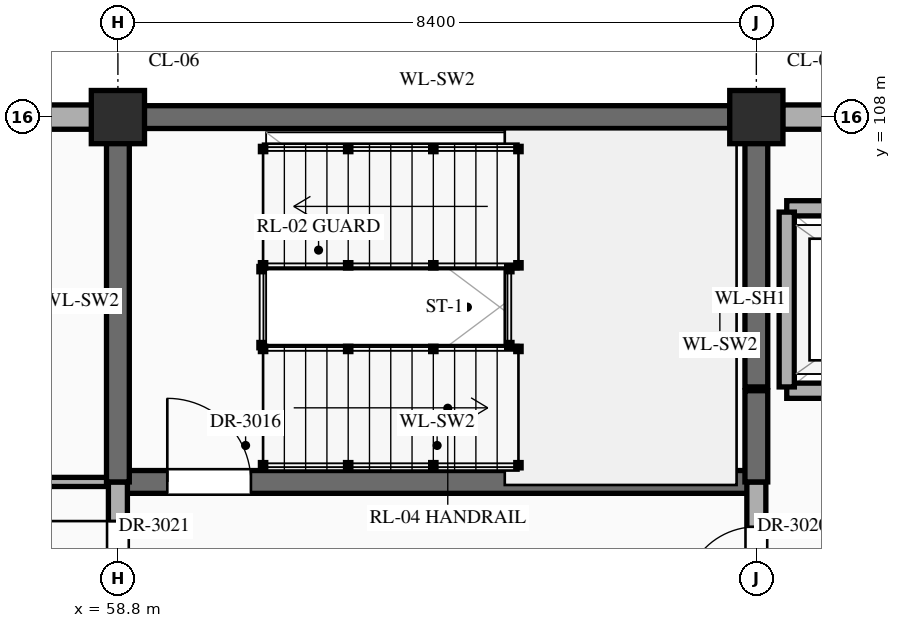
"""IFC4 building model, lengths in metres.
Left out: names, types, materials, properties, quantities, classifications, styles, units other than length and angle.
Written with IfcOpenShell. Run it as: python <this file> out.ifc"""

import sys

from ifc_helpers import new_model, si_unit, direction, frame, frame_2d, origin, origin_2d, place, context, subcontext, project, spatial, rectangle, extrude, element, fill, save


model = new_model("IFC4")
c1 = context("Model", 3, precision=1e-05, world=origin(), true_north=direction((0.0, 1.0)))
c2 = subcontext(c1, "Body", "Model", "MODEL_VIEW")
j1 = project(units=[si_unit("LENGTHUNIT", "METRE"), si_unit("PLANEANGLEUNIT", "RADIAN")], contexts=[c1])
p1 = place(None, origin())
s1 = spatial("IfcSite", under=j1, at=p1, CompositionType="ELEMENT")
p2 = place(p1, origin())
s2 = spatial("IfcBuilding", under=s1, at=p2, CompositionType="ELEMENT")
p3 = place(p2, frame((0.0, 0.0, 51.9)))
s3 = spatial("IfcBuildingStorey", under=s2, at=p3, CompositionType="ELEMENT", Elevation=51.9)
for number, where, z_axis, x_axis in (
    (1, (58.8, 108.0, 0.0), (0.0, 0.0, 1.0), (1.0, 0.0, 0.0)),
    (2, (67.2, 108.0, 0.0), (0.0, 0.0, 1.0), (1.0, 0.0, 0.0)),
):
    element("IfcColumn", number, at=place(p3, frame(where, z_axis=z_axis, x_axis=x_axis)), inside=s3, PredefinedType="COLUMN", context=c2, shape_type="SweptSolid", body=[
        extrude(rectangle(XDim=0.7, YDim=0.7, at=origin_2d()), origin(), (0.0, 0.0, 1.0), 4.2),
    ])
p4 = place(p3, frame((50.745, 108.0, 0.0), z_axis=(0.0, 0.0, 1.0), x_axis=(1.0, 0.0, 0.0)))
e3 = element("IfcWall", 3, at=p4, inside=s3, PredefinedType="STANDARD", context=c2, shape_type="SweptSolid", body=[
    extrude(rectangle(XDim=7.71, YDim=0.32, at=frame_2d((3.855, 0.0))), origin(), (0.0, 0.0, 1.0), 3.31),
])
p5 = place(p4, frame((5.33, 0.0, 0.55)))
e4 = element("IfcOpeningElement", 4, at=p5, cuts=e3, PredefinedType="OPENING", context=c2, shape_type="SweptSolid", body=[
    extrude(rectangle(XDim=1.05, YDim=1.2, at=frame_2d((0.525, 0.6))), frame((0.0, 0.172, 0.0), z_axis=(0.0, -1.0, 0.0), x_axis=(1.0, 0.0, 0.0)), (0.0, 0.0, 1.0), 0.344),
])
p6 = place(p3, frame((59.145, 108.0, 0.0), z_axis=(0.0, 0.0, 1.0), x_axis=(1.0, 0.0, 0.0)))
e5 = element("IfcWall", 5, at=p6, inside=s3, PredefinedType="SHEAR", context=c2, shape_type="SweptSolid", body=[
    extrude(rectangle(XDim=7.71, YDim=0.3, at=frame_2d((3.855, 0.0))), origin(), (0.0, 0.0, 1.0), 3.96),
])
p7 = place(p3, frame((67.545, 108.0, 0.0), z_axis=(0.0, 0.0, 1.0), x_axis=(1.0, 0.0, 0.0)))
e6 = element("IfcWall", 6, at=p7, inside=s3, PredefinedType="STANDARD", context=c2, shape_type="SweptSolid", body=[
    extrude(rectangle(XDim=7.71, YDim=0.32, at=frame_2d((3.855, 0.0))), origin(), (0.0, 0.0, 1.0), 3.31),
])
p8 = place(p3, frame((50.44, 103.2, 0.0), z_axis=(0.0, 0.0, 1.0), x_axis=(1.0, 0.0, 0.0)))
e7 = element("IfcWall", 7, at=p8, inside=s3, PredefinedType="STANDARD", context=c2, shape_type="SweptSolid", body=[
    extrude(rectangle(XDim=8.36, YDim=0.12, at=frame_2d((4.18, 0.0))), origin(), (0.0, 0.0, 1.0), 3.96),
])
p9 = place(p8, frame((3.67, 0.0, 0.0)))
e8 = element("IfcOpeningElement", 8, at=p9, cuts=e7, PredefinedType="OPENING", context=c2, shape_type="SweptSolid", body=[
    extrude(rectangle(XDim=1.02, YDim=2.4, at=frame_2d((0.51, 1.2))), frame((0.0, 0.072, 0.0), z_axis=(0.0, -1.0, 0.0), x_axis=(1.0, 0.0, 0.0)), (0.0, 0.0, 1.0), 0.144),
])
p10 = place(p3, frame((58.8, 103.2, 0.0), z_axis=(0.0, 0.0, 1.0), x_axis=(1.0, 0.0, 0.0)))
e9 = element("IfcWall", 9, at=p10, inside=s3, PredefinedType="SHEAR", context=c2, shape_type="SweptSolid", body=[
    extrude(rectangle(XDim=8.4, YDim=0.3, at=frame_2d((4.2, 0.0))), origin(), (0.0, 0.0, 1.0), 3.96),
])
p11 = place(p10, frame((0.65, 0.0, 0.0)))
e10 = element("IfcOpeningElement", 10, at=p11, cuts=e9, PredefinedType="OPENING", context=c2, shape_type="SweptSolid", body=[
    extrude(rectangle(XDim=1.1, YDim=2.2, at=frame_2d((0.55, 1.1))), frame((0.0, 0.162, 0.0), z_axis=(0.0, -1.0, 0.0), x_axis=(1.0, 0.0, 0.0)), (0.0, 0.0, 1.0), 0.324),
])
p12 = place(p3, frame((67.6, 104.4, 0.0), z_axis=(0.0, 0.0, 1.0), x_axis=(1.0, 0.0, 0.0)))
e11 = element("IfcWall", 11, at=p12, inside=s3, PredefinedType="STANDARD", context=c2, shape_type="SweptSolid", body=[
    extrude(rectangle(XDim=3.0, YDim=0.2, at=frame_2d((1.5, 0.0))), origin(), (0.0, 0.0, 1.0), 3.96),
])
p13 = place(p12, frame((0.9, 0.0, 0.0)))
e12 = element("IfcOpeningElement", 12, at=p13, cuts=e11, PredefinedType="OPENING", context=c2, shape_type="SweptSolid", body=[
    extrude(rectangle(XDim=1.2, YDim=2.15, at=frame_2d((0.6, 1.075))), frame((0.0, 0.112, 0.0), z_axis=(0.0, -1.0, 0.0), x_axis=(1.0, 0.0, 0.0)), (0.0, 0.0, 1.0), 0.224),
])
p14 = place(p3, frame((67.6, 106.8, 0.0), z_axis=(0.0, 0.0, 1.0), x_axis=(1.0, 0.0, 0.0)))
e13 = element("IfcWall", 13, at=p14, inside=s3, PredefinedType="STANDARD", context=c2, shape_type="SweptSolid", body=[
    extrude(rectangle(XDim=3.0, YDim=0.2, at=frame_2d((1.5, 0.0))), origin(), (0.0, 0.0, 1.0), 3.96),
])
p15 = place(p3, frame((58.8, 100.8, 0.0), z_axis=(0.0, 0.0, 1.0), x_axis=(0.0, 1.0, 0.0)))
e14 = element("IfcWall", 14, at=p15, inside=s3, PredefinedType="STANDARD", context=c2, shape_type="SweptSolid", body=[
    extrude(rectangle(XDim=2.4, YDim=0.25, at=frame_2d((1.2, 0.0))), origin(), (0.0, 0.0, 1.0), 3.21),
])
p16 = place(p15, frame((0.785, 0.0, 0.0)))
e15 = element("IfcOpeningElement", 15, at=p16, cuts=e14, PredefinedType="OPENING", context=c2, shape_type="SweptSolid", body=[
    extrude(rectangle(XDim=1.1, YDim=2.2, at=frame_2d((0.55, 1.1))), frame((0.0, 0.137, 0.0), z_axis=(0.0, -1.0, 0.0), x_axis=(1.0, 0.0, 0.0)), (0.0, 0.0, 1.0), 0.274),
])
p17 = place(p3, frame((58.8, 103.2, 0.0), z_axis=(0.0, 0.0, 1.0), x_axis=(0.0, 1.0, 0.0)))
e16 = element("IfcWall", 16, at=p17, inside=s3, PredefinedType="SHEAR", context=c2, shape_type="SweptSolid", body=[
    extrude(rectangle(XDim=4.76, YDim=0.3, at=frame_2d((2.38, 0.0))), origin(), (0.0, 0.0, 1.0), 3.96),
])
p18 = place(p3, frame((67.2, 100.8, 0.0), z_axis=(0.0, 0.0, 1.0), x_axis=(0.0, 1.0, 0.0)))
e17 = element("IfcWall", 17, at=p18, inside=s3, PredefinedType="STANDARD", context=c2, shape_type="SweptSolid", body=[
    extrude(rectangle(XDim=2.4, YDim=0.25, at=frame_2d((1.2, 0.0))), origin(), (0.0, 0.0, 1.0), 3.21),
])
p19 = place(p18, frame((0.86, 0.0, 0.0)))
e18 = element("IfcOpeningElement", 18, at=p19, cuts=e17, PredefinedType="OPENING", context=c2, shape_type="SweptSolid", body=[
    extrude(rectangle(XDim=0.95, YDim=2.15, at=frame_2d((0.475, 1.075))), frame((0.0, 0.137, 0.0), z_axis=(0.0, -1.0, 0.0), x_axis=(1.0, 0.0, 0.0)), (0.0, 0.0, 1.0), 0.274),
])
p20 = place(p3, frame((67.2, 103.2, 0.0), z_axis=(0.0, 0.0, 1.0), x_axis=(0.0, 1.0, 0.0)))
e19 = element("IfcWall", 19, at=p20, inside=s3, PredefinedType="SHEAR", context=c2, shape_type="SweptSolid", body=[
    extrude(rectangle(XDim=1.2, YDim=0.3, at=frame_2d((0.6, 0.0))), origin(), (0.0, 0.0, 1.0), 3.96),
])
p21 = place(p3, frame((67.2, 104.45, 0.0), z_axis=(0.0, 0.0, 1.0), x_axis=(0.0, 1.0, 0.0)))
e20 = element("IfcWall", 20, at=p21, inside=s3, PredefinedType="SHEAR", context=c2, shape_type="SweptSolid", body=[
    extrude(rectangle(XDim=3.46, YDim=0.3, at=frame_2d((1.73, 0.0))), origin(), (0.0, 0.0, 1.0), 3.96),
])
p22 = place(p3, frame((67.6, 104.45, 0.0), z_axis=(0.0, 0.0, 1.0), x_axis=(0.0, 1.0, 0.0)))
e21 = element("IfcWall", 21, at=p22, inside=s3, PredefinedType="STANDARD", context=c2, shape_type="SweptSolid", body=[
    extrude(rectangle(XDim=2.3, YDim=0.2, at=frame_2d((1.15, 0.0))), origin(), (0.0, 0.0, 1.0), 3.96),
])
p23 = place(p11, origin())
e22 = element("IfcDoor", 22, at=p23, inside=s3, OperationType="SINGLE_SWING_LEFT", PredefinedType="DOOR", context=c2, shape_type="SweptSolid", body=[
    extrude(rectangle(XDim=1.1, YDim=2.2, at=frame_2d((0.55, 1.1))), frame((0.0, 0.025, 0.0), z_axis=(0.0, -1.0, 0.0), x_axis=(1.0, 0.0, 0.0)), (0.0, 0.0, 1.0), 0.05),
])
fill(e10, e22)
p24 = place(p19, origin())
e23 = element("IfcDoor", 23, at=p24, inside=s3, OperationType="SINGLE_SWING_LEFT", PredefinedType="DOOR", context=c2, shape_type="SweptSolid", body=[
    extrude(rectangle(XDim=0.95, YDim=2.15, at=frame_2d((0.475, 1.075))), frame((0.0, 0.025, 0.0), z_axis=(0.0, -1.0, 0.0), x_axis=(1.0, 0.0, 0.0)), (0.0, 0.0, 1.0), 0.05),
])
fill(e18, e23)
p25 = place(p16, origin())
e24 = element("IfcDoor", 24, at=p25, inside=s3, OperationType="SINGLE_SWING_RIGHT", PredefinedType="DOOR", context=c2, shape_type="SweptSolid", body=[
    extrude(rectangle(XDim=1.1, YDim=2.2, at=frame_2d((0.55, 1.1))), frame((0.0, 0.025, 0.0), z_axis=(0.0, -1.0, 0.0), x_axis=(1.0, 0.0, 0.0)), (0.0, 0.0, 1.0), 0.05),
])
fill(e15, e24)
save(model, sys.argv[1])
